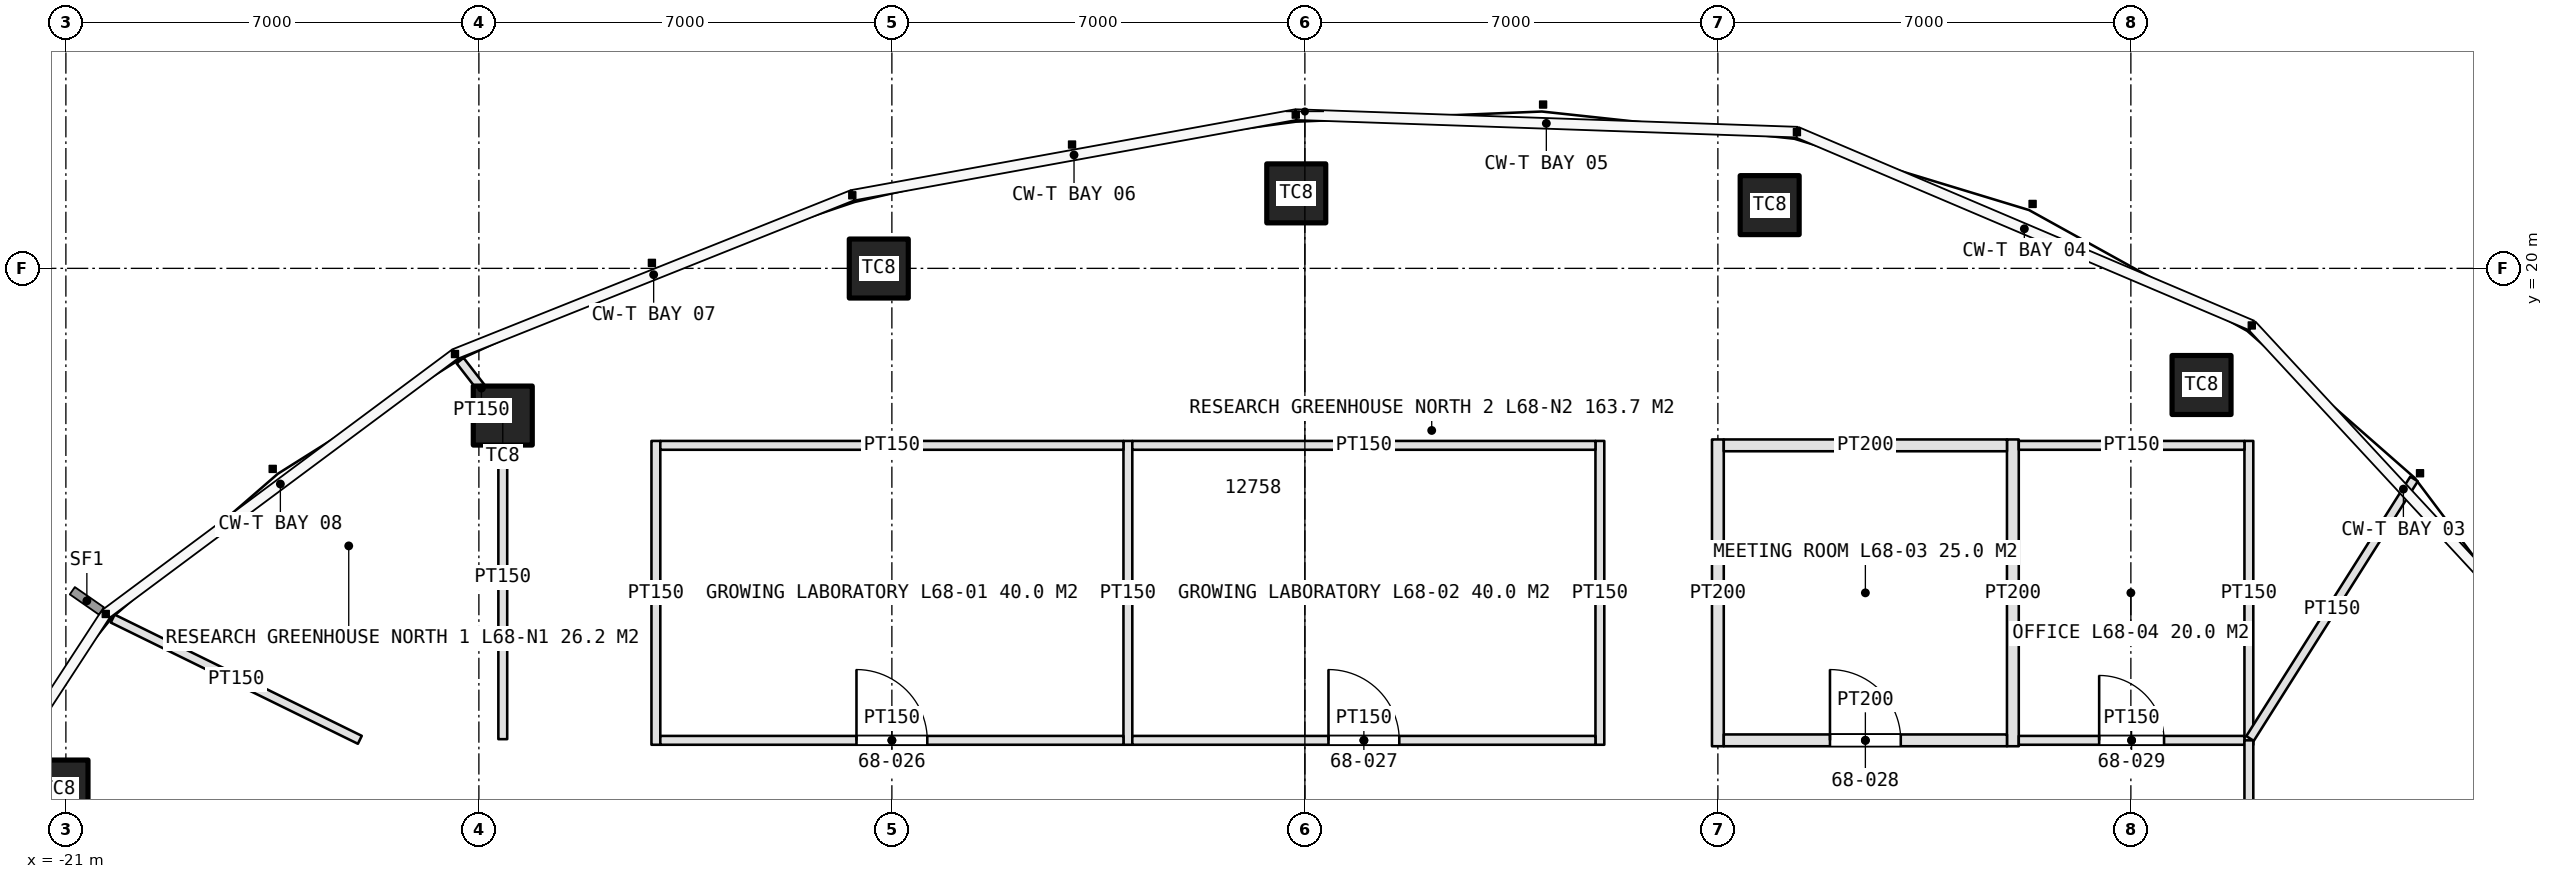
"""IFC4 building model, lengths in metres.
Left out: names, types, materials, properties, quantities, classifications, styles, units other than length and angle.
Written with IfcOpenShell. Run it as: python <this file> out.ifc"""

import sys

from ifc_helpers import new_model, si_unit, direction, frame, frame_2d, origin, origin_2d, place, context, subcontext, project, spatial, rectangle, extrude, element, fill, save


model = new_model("IFC4")
c1 = context("Model", 3, precision=1e-05, world=origin(), true_north=direction((0.0, 1.0)))
c2 = subcontext(c1, "Body", "Model", "MODEL_VIEW")
j1 = project(units=[si_unit("LENGTHUNIT", "METRE"), si_unit("PLANEANGLEUNIT", "RADIAN")], contexts=[c1])
p1 = place(None, origin())
s1 = spatial("IfcSite", under=j1, at=p1, CompositionType="ELEMENT")
p2 = place(p1, origin())
s2 = spatial("IfcBuilding", under=s1, at=p2, CompositionType="ELEMENT")
p3 = place(p2, frame((0.0, 0.0, 304.8)))
s3 = spatial("IfcBuildingStorey", under=s2, at=p3, CompositionType="ELEMENT", Elevation=304.8)
for number, where, z_axis, x_axis in (
    (1, (15.198, 18.023, 0.0), (0.0, 0.0, 1.0), (1.0, 0.0, 0.0)),
    (2, (7.878, 21.072, 0.0), (0.0, 0.0, 1.0), (1.0, 0.0, 0.0)),
    (3, (-0.146, 21.271, 0.0), (0.0, 0.0, 1.0), (1.0, 0.0, 0.0)),
    (4, (-7.222, 19.997, 0.0), (0.0, 0.0, 1.0), (1.0, 0.0, 0.0)),
    (5, (-13.595, 17.505, 0.0), (0.0, 0.0, 1.0), (1.0, 0.0, 0.0)),
    (6, (-21.125, 11.166, 0.0), (0.0, 0.0, 1.0), (1.0, 0.0, 0.0)),
):
    element("IfcColumn", number, at=place(p3, frame(where, z_axis=z_axis, x_axis=x_axis)), inside=s3, PredefinedType="COLUMN", context=c2, shape_type="SweptSolid", body=[
        extrude(rectangle(XDim=1.0, YDim=1.0, at=origin_2d()), origin(), (0.0, 0.0, 1.0), 4.2),
    ])
for number, where, z_axis, x_axis in (
    (7, (-11.0, 11.925, 0.0), (0.0, 0.0, 1.0), (0.0, 1.0, 0.0)),
    (8, (-3.0, 11.925, 0.0), (0.0, 0.0, 1.0), (0.0, 1.0, 0.0)),
    (9, (5.0, 11.925, 0.0), (0.0, 0.0, 1.0), (0.0, 1.0, 0.0)),
):
    element("IfcWall", number, at=place(p3, frame(where, z_axis=z_axis, x_axis=x_axis)), inside=s3, PredefinedType="PARTITIONING", context=c2, shape_type="SweptSolid", body=[
        extrude(rectangle(XDim=5.15, YDim=0.15, at=frame_2d((2.575, 0.0))), origin(), (0.0, 0.0, 1.0), 3.0),
    ])
p4 = place(p3, frame((-10.925, 12.0, 0.0), z_axis=(0.0, 0.0, 1.0), x_axis=(1.0, 0.0, 0.0)))
e10 = element("IfcWall", 10, at=p4, inside=s3, PredefinedType="PARTITIONING", context=c2, shape_type="SweptSolid", body=[
    extrude(rectangle(XDim=7.85, YDim=0.15, at=frame_2d((3.925, 0.0))), origin(), (0.0, 0.0, 1.0), 3.0),
])
p5 = place(p4, frame((3.325, 0.0, 0.0)))
e11 = element("IfcOpeningElement", 11, at=p5, cuts=e10, PredefinedType="OPENING", context=c2, shape_type="SweptSolid", body=[
    extrude(rectangle(XDim=1.2, YDim=2.3, at=frame_2d((0.6, 1.15))), frame((0.0, 0.085, 0.0), z_axis=(0.0, -1.0, 0.0), x_axis=(1.0, 0.0, 0.0)), (0.0, 0.0, 1.0), 0.17),
])
p6 = place(p3, frame((-10.925, 17.0, 0.0), z_axis=(0.0, 0.0, 1.0), x_axis=(1.0, 0.0, 0.0)))
e12 = element("IfcWall", 12, at=p6, inside=s3, PredefinedType="PARTITIONING", context=c2, shape_type="SweptSolid", body=[
    extrude(rectangle(XDim=7.85, YDim=0.15, at=frame_2d((3.925, 0.0))), origin(), (0.0, 0.0, 1.0), 3.0),
])
p7 = place(p3, frame((-2.925, 12.0, 0.0), z_axis=(0.0, 0.0, 1.0), x_axis=(1.0, 0.0, 0.0)))
e13 = element("IfcWall", 13, at=p7, inside=s3, PredefinedType="PARTITIONING", context=c2, shape_type="SweptSolid", body=[
    extrude(rectangle(XDim=7.85, YDim=0.15, at=frame_2d((3.925, 0.0))), origin(), (0.0, 0.0, 1.0), 3.0),
])
p8 = place(p7, frame((3.325, 0.0, 0.0)))
e14 = element("IfcOpeningElement", 14, at=p8, cuts=e13, PredefinedType="OPENING", context=c2, shape_type="SweptSolid", body=[
    extrude(rectangle(XDim=1.2, YDim=2.3, at=frame_2d((0.6, 1.15))), frame((0.0, 0.085, 0.0), z_axis=(0.0, -1.0, 0.0), x_axis=(1.0, 0.0, 0.0)), (0.0, 0.0, 1.0), 0.17),
])
p9 = place(p3, frame((-2.925, 17.0, 0.0), z_axis=(0.0, 0.0, 1.0), x_axis=(1.0, 0.0, 0.0)))
e15 = element("IfcWall", 15, at=p9, inside=s3, PredefinedType="PARTITIONING", context=c2, shape_type="SweptSolid", body=[
    extrude(rectangle(XDim=7.85, YDim=0.15, at=frame_2d((3.925, 0.0))), origin(), (0.0, 0.0, 1.0), 3.0),
])
for number, where, z_axis, x_axis in (
    (16, (7.0, 11.9, 0.0), (0.0, 0.0, 1.0), (0.0, 1.0, 0.0)),
    (17, (12.0, 11.9, 0.0), (0.0, 0.0, 1.0), (0.0, 1.0, 0.0)),
):
    element("IfcWall", number, at=place(p3, frame(where, z_axis=z_axis, x_axis=x_axis)), inside=s3, PredefinedType="PARTITIONING", context=c2, shape_type="SweptSolid", body=[
        extrude(rectangle(XDim=5.2, YDim=0.2, at=frame_2d((2.6, 0.0))), origin(), (0.0, 0.0, 1.0), 3.0),
    ])
p10 = place(p3, frame((16.0, 11.925, 0.0), z_axis=(0.0, 0.0, 1.0), x_axis=(0.0, 1.0, 0.0)))
e18 = element("IfcWall", 18, at=p10, inside=s3, PredefinedType="PARTITIONING", context=c2, shape_type="SweptSolid", body=[
    extrude(rectangle(XDim=5.15, YDim=0.15, at=frame_2d((2.575, 0.0))), origin(), (0.0, 0.0, 1.0), 3.0),
])
p11 = place(p3, frame((7.1, 12.0, 0.0), z_axis=(0.0, 0.0, 1.0), x_axis=(1.0, 0.0, 0.0)))
e19 = element("IfcWall", 19, at=p11, inside=s3, PredefinedType="PARTITIONING", context=c2, shape_type="SweptSolid", body=[
    extrude(rectangle(XDim=4.8, YDim=0.2, at=frame_2d((2.4, 0.0))), origin(), (0.0, 0.0, 1.0), 3.0),
])
p12 = place(p11, frame((1.8, 0.0, 0.0)))
e20 = element("IfcOpeningElement", 20, at=p12, cuts=e19, PredefinedType="OPENING", context=c2, shape_type="SweptSolid", body=[
    extrude(rectangle(XDim=1.2, YDim=2.4, at=frame_2d((0.6, 1.2))), frame((0.0, 0.11, 0.0), z_axis=(0.0, -1.0, 0.0), x_axis=(1.0, 0.0, 0.0)), (0.0, 0.0, 1.0), 0.22),
])
p13 = place(p3, frame((7.1, 17.0, 0.0), z_axis=(0.0, 0.0, 1.0), x_axis=(1.0, 0.0, 0.0)))
e21 = element("IfcWall", 21, at=p13, inside=s3, PredefinedType="PARTITIONING", context=c2, shape_type="SweptSolid", body=[
    extrude(rectangle(XDim=4.8, YDim=0.2, at=frame_2d((2.4, 0.0))), origin(), (0.0, 0.0, 1.0), 3.0),
])
p14 = place(p3, frame((12.1, 12.0, 0.0), z_axis=(0.0, 0.0, 1.0), x_axis=(1.0, 0.0, 0.0)))
e22 = element("IfcWall", 22, at=p14, inside=s3, PredefinedType="PARTITIONING", context=c2, shape_type="SweptSolid", body=[
    extrude(rectangle(XDim=3.825, YDim=0.15, at=frame_2d((1.913, 0.0))), origin(), (0.0, 0.0, 1.0), 3.0),
])
p15 = place(p14, frame((1.363, 0.0, 0.0)))
e23 = element("IfcOpeningElement", 23, at=p15, cuts=e22, PredefinedType="OPENING", context=c2, shape_type="SweptSolid", body=[
    extrude(rectangle(XDim=1.1, YDim=2.3, at=frame_2d((0.55, 1.15))), frame((0.0, 0.085, 0.0), z_axis=(0.0, -1.0, 0.0), x_axis=(1.0, 0.0, 0.0)), (0.0, 0.0, 1.0), 0.17),
])
p16 = place(p3, frame((12.1, 17.0, 0.0), z_axis=(0.0, 0.0, 1.0), x_axis=(1.0, 0.0, 0.0)))
e24 = element("IfcWall", 24, at=p16, inside=s3, PredefinedType="PARTITIONING", context=c2, shape_type="SweptSolid", body=[
    extrude(rectangle(XDim=3.825, YDim=0.15, at=frame_2d((1.913, 0.0))), origin(), (0.0, 0.0, 1.0), 3.0),
])
p17 = place(p3, frame((-16.018, 12.009, 0.0), z_axis=(0.0, 0.0, 1.0), x_axis=(-0.897771840996, 0.440460805879, 0.0)))
e25 = element("IfcWall", 25, at=p17, inside=s3, PredefinedType="PARTITIONING", context=c2, shape_type="SweptSolid", body=[
    extrude(rectangle(XDim=4.666, YDim=0.15, at=frame_2d((2.333, 0.0))), origin(), (0.0, 0.0, 1.0), 3.0),
])
p18 = place(p3, frame((16.02, 12.032, 0.0), z_axis=(0.0, 0.0, 1.0), x_axis=(0.534176584227, 0.845372921771, 0.0)))
e26 = element("IfcWall", 26, at=p18, inside=s3, PredefinedType="PARTITIONING", context=c2, shape_type="SweptSolid", body=[
    extrude(rectangle(XDim=5.203, YDim=0.15, at=frame_2d((2.602, 0.0))), origin(), (0.0, 0.0, 1.0), 3.0),
])
p19 = place(p3, frame((-13.595, 12.02, 0.0), z_axis=(0.0, 0.0, 1.0), x_axis=(0.0, 1.0, 0.0)))
e27 = element("IfcWall", 27, at=p19, inside=s3, PredefinedType="PARTITIONING", context=c2, shape_type="SweptSolid", body=[
    extrude(rectangle(XDim=5.485, YDim=0.15, at=frame_2d((2.742, 0.0))), origin(), (0.0, 0.0, 1.0), 3.0),
])
p20 = place(p3, frame((-13.595, 17.505, 0.0), z_axis=(0.0, 0.0, 1.0), x_axis=(-0.61332442804, 0.789831086986, 0.0)))
e28 = element("IfcWall", 28, at=p20, inside=s3, PredefinedType="PARTITIONING", context=c2, shape_type="SweptSolid", body=[
    extrude(rectangle(XDim=1.18, YDim=0.15, at=frame_2d((0.59, 0.0))), origin(), (0.0, 0.0, 1.0), 3.0),
])
p21 = place(p3, frame((16.0, 6.0, 0.0), z_axis=(0.0, 0.0, 1.0), x_axis=(0.0, 1.0, 0.0)))
e29 = element("IfcWall", 29, at=p21, inside=s3, PredefinedType="PARTITIONING", context=c2, shape_type="SweptSolid", body=[
    extrude(rectangle(XDim=6.0, YDim=0.15, at=frame_2d((3.0, 0.0))), origin(), (0.0, 0.0, 1.0), 3.0),
])
p22 = place(p5, origin())
e30 = element("IfcDoor", 30, at=p22, inside=s3, OperationType="SINGLE_SWING_LEFT", PredefinedType="DOOR", context=c2, shape_type="SweptSolid", body=[
    extrude(rectangle(XDim=1.2, YDim=2.3, at=frame_2d((0.6, 1.15))), frame((0.0, 0.025, 0.0), z_axis=(0.0, -1.0, 0.0), x_axis=(1.0, 0.0, 0.0)), (0.0, 0.0, 1.0), 0.05),
])
fill(e11, e30)
p23 = place(p8, origin())
e31 = element("IfcDoor", 31, at=p23, inside=s3, OperationType="SINGLE_SWING_LEFT", PredefinedType="DOOR", context=c2, shape_type="SweptSolid", body=[
    extrude(rectangle(XDim=1.2, YDim=2.3, at=frame_2d((0.6, 1.15))), frame((0.0, 0.025, 0.0), z_axis=(0.0, -1.0, 0.0), x_axis=(1.0, 0.0, 0.0)), (0.0, 0.0, 1.0), 0.05),
])
fill(e14, e31)
p24 = place(p12, origin())
e32 = element("IfcDoor", 32, at=p24, inside=s3, OperationType="SINGLE_SWING_LEFT", PredefinedType="DOOR", context=c2, shape_type="SweptSolid", body=[
    extrude(rectangle(XDim=1.2, YDim=2.4, at=frame_2d((0.6, 1.2))), frame((0.0, 0.025, 0.0), z_axis=(0.0, -1.0, 0.0), x_axis=(1.0, 0.0, 0.0)), (0.0, 0.0, 1.0), 0.05),
])
fill(e20, e32)
p25 = place(p15, origin())
e33 = element("IfcDoor", 33, at=p25, inside=s3, OperationType="SINGLE_SWING_LEFT", PredefinedType="DOOR", context=c2, shape_type="SweptSolid", body=[
    extrude(rectangle(XDim=1.1, YDim=2.3, at=frame_2d((0.55, 1.15))), frame((0.0, 0.025, 0.0), z_axis=(0.0, -1.0, 0.0), x_axis=(1.0, 0.0, 0.0)), (0.0, 0.0, 1.0), 0.05),
])
fill(e23, e33)
save(model, sys.argv[1])
